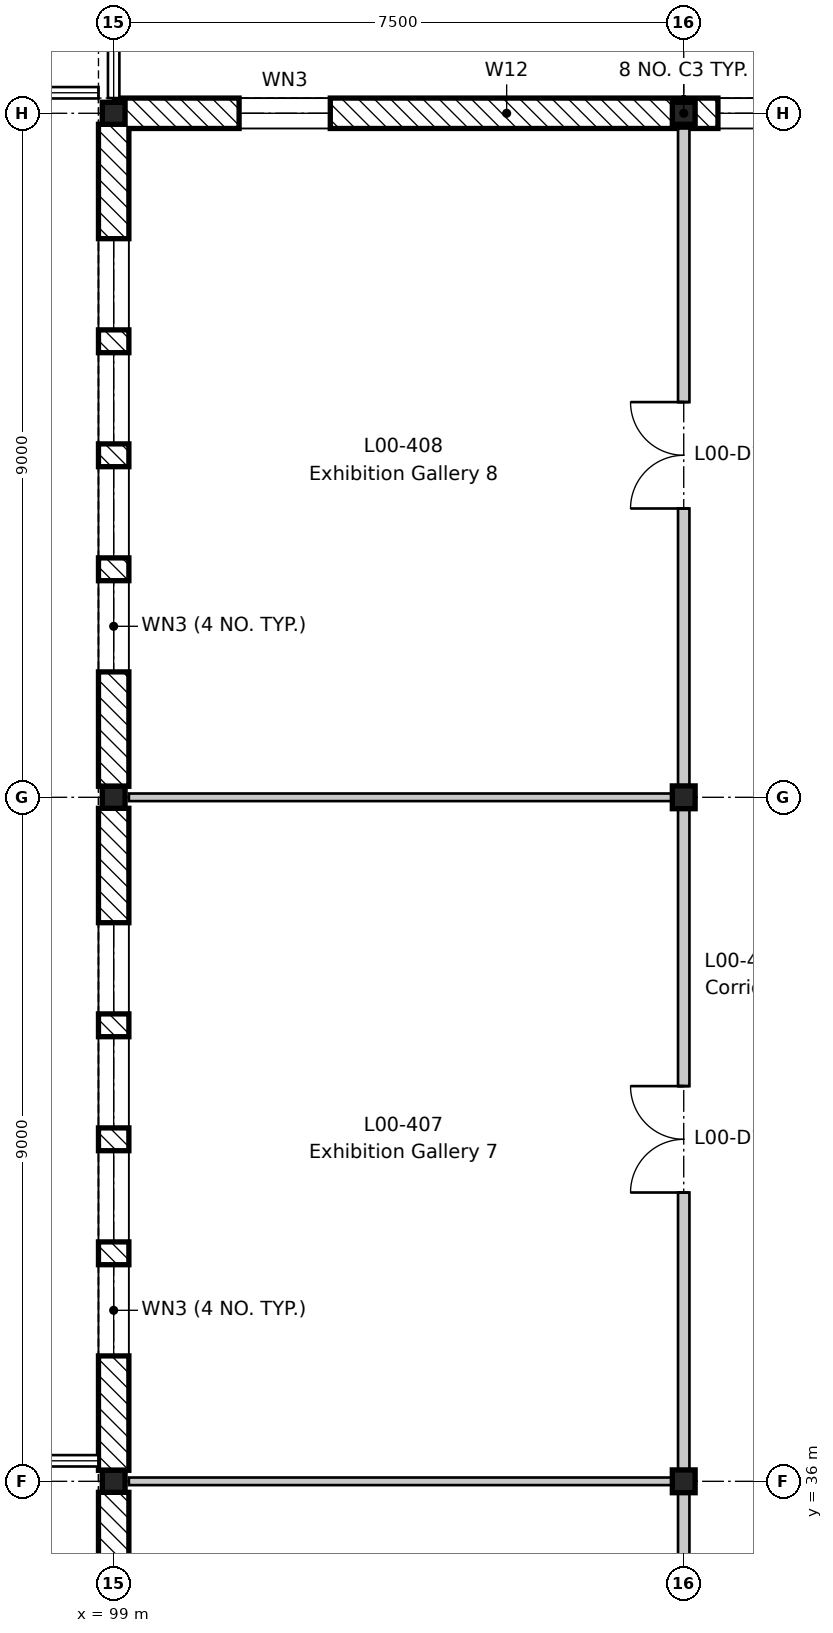
"""IFC4 building model, lengths in metres.
Left out: names, types, materials, properties, quantities, classifications, styles, units other than length and angle.
Written with IfcOpenShell. Run it as: python <this file> out.ifc"""

import sys

from ifc_helpers import new_model, si_unit, direction, frame, frame_2d, origin, origin_2d, place, context, subcontext, project, spatial, rectangle, i_section, extrude, element, fill, save


model = new_model("IFC4")
c1 = context("Model", 3, precision=1e-05, world=origin(), true_north=direction((0.0, 1.0)))
c2 = subcontext(c1, "Body", "Model", "MODEL_VIEW")
j1 = project(units=[si_unit("LENGTHUNIT", "METRE"), si_unit("PLANEANGLEUNIT", "RADIAN")], contexts=[c1])
p1 = place(None, origin())
s1 = spatial("IfcSite", under=j1, at=p1, CompositionType="ELEMENT")
p2 = place(p1, origin())
s2 = spatial("IfcBuilding", under=s1, at=p2, CompositionType="ELEMENT")
p3 = place(p2, origin())
s3 = spatial("IfcBuildingStorey", under=s2, at=p3, CompositionType="ELEMENT", Elevation=0.0)
for number, where, z_axis, x_axis in (
    (1, (99.0, 36.0, -0.6), (0.0, 0.0, 1.0), (1.0, 0.0, 0.0)),
    (2, (99.0, 45.0, -0.6), (0.0, 0.0, 1.0), (1.0, 0.0, 0.0)),
    (3, (99.0, 54.0, -0.6), (0.0, 0.0, 1.0), (1.0, 0.0, 0.0)),
):
    element("IfcColumn", number, at=place(p3, frame(where, z_axis=z_axis, x_axis=x_axis)), inside=s3, PredefinedType="COLUMN", context=c2, shape_type="SweptSolid", body=[
        extrude(i_section(OverallWidth=0.3, OverallDepth=0.29, WebThickness=0.009, FlangeThickness=0.014, FilletRadius=0.027, at=origin_2d()), origin(), (0.0, 0.0, 1.0), 5.8),
    ])
for number, where, z_axis, x_axis in (
    (4, (106.5, 36.0, -0.6), (0.0, 0.0, 1.0), (1.0, 0.0, 0.0)),
    (5, (106.5, 45.0, -0.6), (0.0, 0.0, 1.0), (1.0, 0.0, 0.0)),
):
    element("IfcColumn", number, at=place(p3, frame(where, z_axis=z_axis, x_axis=x_axis)), inside=s3, PredefinedType="COLUMN", context=c2, shape_type="SweptSolid", body=[
        extrude(i_section(OverallWidth=0.3, OverallDepth=0.3, WebThickness=0.011, FlangeThickness=0.019, FilletRadius=0.027, at=origin_2d()), origin(), (0.0, 0.0, 1.0), 5.8),
    ])
p4 = place(p3, frame((106.5, 54.0, -0.6), z_axis=(0.0, 0.0, 1.0), x_axis=(1.0, 0.0, 0.0)))
e6 = element("IfcColumn", 6, at=p4, inside=s3, PredefinedType="COLUMN", context=c2, shape_type="SweptSolid", body=[
    extrude(i_section(OverallWidth=0.3, OverallDepth=0.29, WebThickness=0.009, FlangeThickness=0.014, FilletRadius=0.027, at=origin_2d()), origin(), (0.0, 0.0, 1.0), 5.8),
])
p5 = place(p3, frame((99.0, 27.145, 0.0), z_axis=(0.0, 0.0, 1.0), x_axis=(0.0, 1.0, 0.0)))
e7 = element("IfcWall", 7, at=p5, inside=s3, PredefinedType="STANDARD", context=c2, shape_type="SweptSolid", body=[
    extrude(rectangle(XDim=8.71, YDim=0.4, at=frame_2d((4.355, 0.0))), origin(), (0.0, 0.0, 1.0), 4.8),
])
p6 = place(p5, frame((1.505, 0.0, 0.6)))
e8 = element("IfcOpeningElement", 8, at=p6, cuts=e7, PredefinedType="OPENING", context=c2, shape_type="SweptSolid", body=[
    extrude(rectangle(XDim=1.2, YDim=3.9, at=frame_2d((0.6, 1.95))), frame((0.0, 0.21, 0.0), z_axis=(0.0, -1.0, 0.0), x_axis=(1.0, 0.0, 0.0)), (0.0, 0.0, 1.0), 0.42),
])
p7 = place(p5, frame((3.005, 0.0, 0.6)))
e9 = element("IfcOpeningElement", 9, at=p7, cuts=e7, PredefinedType="OPENING", context=c2, shape_type="SweptSolid", body=[
    extrude(rectangle(XDim=1.2, YDim=3.9, at=frame_2d((0.6, 1.95))), frame((0.0, 0.21, 0.0), z_axis=(0.0, -1.0, 0.0), x_axis=(1.0, 0.0, 0.0)), (0.0, 0.0, 1.0), 0.42),
])
p8 = place(p5, frame((4.505, 0.0, 0.6)))
e10 = element("IfcOpeningElement", 10, at=p8, cuts=e7, PredefinedType="OPENING", context=c2, shape_type="SweptSolid", body=[
    extrude(rectangle(XDim=1.2, YDim=3.9, at=frame_2d((0.6, 1.95))), frame((0.0, 0.21, 0.0), z_axis=(0.0, -1.0, 0.0), x_axis=(1.0, 0.0, 0.0)), (0.0, 0.0, 1.0), 0.42),
])
p9 = place(p5, frame((6.005, 0.0, 0.6)))
e11 = element("IfcOpeningElement", 11, at=p9, cuts=e7, PredefinedType="OPENING", context=c2, shape_type="SweptSolid", body=[
    extrude(rectangle(XDim=1.2, YDim=3.9, at=frame_2d((0.6, 1.95))), frame((0.0, 0.21, 0.0), z_axis=(0.0, -1.0, 0.0), x_axis=(1.0, 0.0, 0.0)), (0.0, 0.0, 1.0), 0.42),
])
p10 = place(p3, frame((99.0, 36.145, 0.0), z_axis=(0.0, 0.0, 1.0), x_axis=(0.0, 1.0, 0.0)))
e12 = element("IfcWall", 12, at=p10, inside=s3, PredefinedType="STANDARD", context=c2, shape_type="SweptSolid", body=[
    extrude(rectangle(XDim=8.71, YDim=0.4, at=frame_2d((4.355, 0.0))), origin(), (0.0, 0.0, 1.0), 4.8),
])
p11 = place(p10, frame((1.505, 0.0, 0.6)))
e13 = element("IfcOpeningElement", 13, at=p11, cuts=e12, PredefinedType="OPENING", context=c2, shape_type="SweptSolid", body=[
    extrude(rectangle(XDim=1.2, YDim=3.9, at=frame_2d((0.6, 1.95))), frame((0.0, 0.21, 0.0), z_axis=(0.0, -1.0, 0.0), x_axis=(1.0, 0.0, 0.0)), (0.0, 0.0, 1.0), 0.42),
])
p12 = place(p10, frame((3.005, 0.0, 0.6)))
e14 = element("IfcOpeningElement", 14, at=p12, cuts=e12, PredefinedType="OPENING", context=c2, shape_type="SweptSolid", body=[
    extrude(rectangle(XDim=1.2, YDim=3.9, at=frame_2d((0.6, 1.95))), frame((0.0, 0.21, 0.0), z_axis=(0.0, -1.0, 0.0), x_axis=(1.0, 0.0, 0.0)), (0.0, 0.0, 1.0), 0.42),
])
p13 = place(p10, frame((4.505, 0.0, 0.6)))
e15 = element("IfcOpeningElement", 15, at=p13, cuts=e12, PredefinedType="OPENING", context=c2, shape_type="SweptSolid", body=[
    extrude(rectangle(XDim=1.2, YDim=3.9, at=frame_2d((0.6, 1.95))), frame((0.0, 0.21, 0.0), z_axis=(0.0, -1.0, 0.0), x_axis=(1.0, 0.0, 0.0)), (0.0, 0.0, 1.0), 0.42),
])
p14 = place(p10, frame((6.005, 0.0, 0.6)))
e16 = element("IfcOpeningElement", 16, at=p14, cuts=e12, PredefinedType="OPENING", context=c2, shape_type="SweptSolid", body=[
    extrude(rectangle(XDim=1.2, YDim=3.9, at=frame_2d((0.6, 1.95))), frame((0.0, 0.21, 0.0), z_axis=(0.0, -1.0, 0.0), x_axis=(1.0, 0.0, 0.0)), (0.0, 0.0, 1.0), 0.42),
])
p15 = place(p3, frame((99.0, 45.145, 0.0), z_axis=(0.0, 0.0, 1.0), x_axis=(0.0, 1.0, 0.0)))
e17 = element("IfcWall", 17, at=p15, inside=s3, PredefinedType="STANDARD", context=c2, shape_type="SweptSolid", body=[
    extrude(rectangle(XDim=8.71, YDim=0.4, at=frame_2d((4.355, 0.0))), origin(), (0.0, 0.0, 1.0), 4.8),
])
p16 = place(p15, frame((1.505, 0.0, 0.6)))
e18 = element("IfcOpeningElement", 18, at=p16, cuts=e17, PredefinedType="OPENING", context=c2, shape_type="SweptSolid", body=[
    extrude(rectangle(XDim=1.2, YDim=3.9, at=frame_2d((0.6, 1.95))), frame((0.0, 0.21, 0.0), z_axis=(0.0, -1.0, 0.0), x_axis=(1.0, 0.0, 0.0)), (0.0, 0.0, 1.0), 0.42),
])
p17 = place(p15, frame((3.005, 0.0, 0.6)))
e19 = element("IfcOpeningElement", 19, at=p17, cuts=e17, PredefinedType="OPENING", context=c2, shape_type="SweptSolid", body=[
    extrude(rectangle(XDim=1.2, YDim=3.9, at=frame_2d((0.6, 1.95))), frame((0.0, 0.21, 0.0), z_axis=(0.0, -1.0, 0.0), x_axis=(1.0, 0.0, 0.0)), (0.0, 0.0, 1.0), 0.42),
])
p18 = place(p15, frame((4.505, 0.0, 0.6)))
e20 = element("IfcOpeningElement", 20, at=p18, cuts=e17, PredefinedType="OPENING", context=c2, shape_type="SweptSolid", body=[
    extrude(rectangle(XDim=1.2, YDim=3.9, at=frame_2d((0.6, 1.95))), frame((0.0, 0.21, 0.0), z_axis=(0.0, -1.0, 0.0), x_axis=(1.0, 0.0, 0.0)), (0.0, 0.0, 1.0), 0.42),
])
p19 = place(p15, frame((6.005, 0.0, 0.6)))
e21 = element("IfcOpeningElement", 21, at=p19, cuts=e17, PredefinedType="OPENING", context=c2, shape_type="SweptSolid", body=[
    extrude(rectangle(XDim=1.2, YDim=3.9, at=frame_2d((0.6, 1.95))), frame((0.0, 0.21, 0.0), z_axis=(0.0, -1.0, 0.0), x_axis=(1.0, 0.0, 0.0)), (0.0, 0.0, 1.0), 0.42),
])
p20 = place(p3, frame((99.009, 54.0, 0.0), z_axis=(0.0, 0.0, 1.0), x_axis=(1.0, 0.0, 0.0)))
e22 = element("IfcWall", 22, at=p20, inside=s3, PredefinedType="STANDARD", context=c2, shape_type="SweptSolid", body=[
    extrude(rectangle(XDim=7.481, YDim=0.4, at=frame_2d((3.741, 0.0))), origin(), (0.0, 0.0, 1.0), 4.87),
])
p21 = place(p20, frame((1.641, 0.0, 0.6)))
e23 = element("IfcOpeningElement", 23, at=p21, cuts=e22, PredefinedType="OPENING", context=c2, shape_type="SweptSolid", body=[
    extrude(rectangle(XDim=1.2, YDim=3.9, at=frame_2d((0.6, 1.95))), frame((0.0, 0.21, 0.0), z_axis=(0.0, -1.0, 0.0), x_axis=(1.0, 0.0, 0.0)), (0.0, 0.0, 1.0), 0.42),
])
p22 = place(p3, frame((106.509, 54.0, 0.0), z_axis=(0.0, 0.0, 1.0), x_axis=(1.0, 0.0, 0.0)))
e24 = element("IfcWall", 24, at=p22, inside=s3, PredefinedType="STANDARD", context=c2, shape_type="SweptSolid", body=[
    extrude(rectangle(XDim=2.981, YDim=0.4, at=frame_2d((1.491, 0.0))), origin(), (0.0, 0.0, 1.0), 5.0),
])
p23 = place(p22, frame((0.441, 0.0, 0.9)))
e25 = element("IfcOpeningElement", 25, at=p23, cuts=e24, PredefinedType="OPENING", context=c2, shape_type="SweptSolid", body=[
    extrude(rectangle(XDim=2.1, YDim=2.1, at=frame_2d((1.05, 1.05))), frame((0.0, 0.21, 0.0), z_axis=(0.0, -1.0, 0.0), x_axis=(1.0, 0.0, 0.0)), (0.0, 0.0, 1.0), 0.42),
])
for number, where, z_axis, x_axis in (
    (26, (99.2, 36.0, 0.0), (0.0, 0.0, 1.0), (1.0, 0.0, 0.0)),
    (27, (99.2, 45.0, 0.0), (0.0, 0.0, 1.0), (1.0, 0.0, 0.0)),
):
    element("IfcWall", number, at=place(p3, frame(where, z_axis=z_axis, x_axis=x_axis)), inside=s3, PredefinedType="PARTITIONING", context=c2, shape_type="SweptSolid", body=[
        extrude(rectangle(XDim=7.225, YDim=0.1, at=frame_2d((3.613, 0.0))), origin(), (0.0, 0.0, 1.0), 4.85),
    ])
p24 = place(p3, frame((106.5, 9.0, 0.0), z_axis=(0.0, 0.0, 1.0), x_axis=(0.0, 1.0, 0.0)))
e28 = element("IfcWall", 28, at=p24, inside=s3, PredefinedType="PARTITIONING", context=c2, shape_type="SweptSolid", body=[
    extrude(rectangle(XDim=44.8, YDim=0.15, at=frame_2d((22.4, 0.0))), origin(), (0.0, 0.0, 1.0), 4.68),
])
p25 = place(p24, frame((3.8, 0.0, 0.0)))
e29 = element("IfcOpeningElement", 29, at=p25, cuts=e28, PredefinedType="OPENING", context=c2, shape_type="SweptSolid", body=[
    extrude(rectangle(XDim=1.4, YDim=2.1, at=frame_2d((0.7, 1.05))), frame((0.0, 0.085, 0.0), z_axis=(0.0, -1.0, 0.0), x_axis=(1.0, 0.0, 0.0)), (0.0, 0.0, 1.0), 0.17),
])
p26 = place(p24, frame((12.8, 0.0, 0.0)))
e30 = element("IfcOpeningElement", 30, at=p26, cuts=e28, PredefinedType="OPENING", context=c2, shape_type="SweptSolid", body=[
    extrude(rectangle(XDim=1.4, YDim=2.1, at=frame_2d((0.7, 1.05))), frame((0.0, 0.085, 0.0), z_axis=(0.0, -1.0, 0.0), x_axis=(1.0, 0.0, 0.0)), (0.0, 0.0, 1.0), 0.17),
])
p27 = place(p24, frame((21.8, 0.0, 0.0)))
e31 = element("IfcOpeningElement", 31, at=p27, cuts=e28, PredefinedType="OPENING", context=c2, shape_type="SweptSolid", body=[
    extrude(rectangle(XDim=1.4, YDim=2.1, at=frame_2d((0.7, 1.05))), frame((0.0, 0.085, 0.0), z_axis=(0.0, -1.0, 0.0), x_axis=(1.0, 0.0, 0.0)), (0.0, 0.0, 1.0), 0.17),
])
p28 = place(p24, frame((30.8, 0.0, 0.0)))
e32 = element("IfcOpeningElement", 32, at=p28, cuts=e28, PredefinedType="OPENING", context=c2, shape_type="SweptSolid", body=[
    extrude(rectangle(XDim=1.4, YDim=2.1, at=frame_2d((0.7, 1.05))), frame((0.0, 0.085, 0.0), z_axis=(0.0, -1.0, 0.0), x_axis=(1.0, 0.0, 0.0)), (0.0, 0.0, 1.0), 0.17),
])
p29 = place(p24, frame((39.8, 0.0, 0.0)))
e33 = element("IfcOpeningElement", 33, at=p29, cuts=e28, PredefinedType="OPENING", context=c2, shape_type="SweptSolid", body=[
    extrude(rectangle(XDim=1.4, YDim=2.1, at=frame_2d((0.7, 1.05))), frame((0.0, 0.085, 0.0), z_axis=(0.0, -1.0, 0.0), x_axis=(1.0, 0.0, 0.0)), (0.0, 0.0, 1.0), 0.17),
])
p30 = place(p11, origin())
e34 = element("IfcWindow", 34, at=p30, inside=s3, PartitioningType="SINGLE_PANEL", PredefinedType="WINDOW", context=c2, shape_type="SweptSolid", body=[
    extrude(rectangle(XDim=1.2, YDim=3.9, at=frame_2d((0.6, 1.95))), frame((0.0, 0.03, 0.0), z_axis=(0.0, -1.0, 0.0), x_axis=(1.0, 0.0, 0.0)), (0.0, 0.0, 1.0), 0.06),
])
fill(e13, e34)
p31 = place(p12, origin())
e35 = element("IfcWindow", 35, at=p31, inside=s3, PartitioningType="SINGLE_PANEL", PredefinedType="WINDOW", context=c2, shape_type="SweptSolid", body=[
    extrude(rectangle(XDim=1.2, YDim=3.9, at=frame_2d((0.6, 1.95))), frame((0.0, 0.03, 0.0), z_axis=(0.0, -1.0, 0.0), x_axis=(1.0, 0.0, 0.0)), (0.0, 0.0, 1.0), 0.06),
])
fill(e14, e35)
p32 = place(p13, origin())
e36 = element("IfcWindow", 36, at=p32, inside=s3, PartitioningType="SINGLE_PANEL", PredefinedType="WINDOW", context=c2, shape_type="SweptSolid", body=[
    extrude(rectangle(XDim=1.2, YDim=3.9, at=frame_2d((0.6, 1.95))), frame((0.0, 0.03, 0.0), z_axis=(0.0, -1.0, 0.0), x_axis=(1.0, 0.0, 0.0)), (0.0, 0.0, 1.0), 0.06),
])
fill(e15, e36)
p33 = place(p14, origin())
e37 = element("IfcWindow", 37, at=p33, inside=s3, PartitioningType="SINGLE_PANEL", PredefinedType="WINDOW", context=c2, shape_type="SweptSolid", body=[
    extrude(rectangle(XDim=1.2, YDim=3.9, at=frame_2d((0.6, 1.95))), frame((0.0, 0.03, 0.0), z_axis=(0.0, -1.0, 0.0), x_axis=(1.0, 0.0, 0.0)), (0.0, 0.0, 1.0), 0.06),
])
fill(e16, e37)
p34 = place(p16, origin())
e38 = element("IfcWindow", 38, at=p34, inside=s3, PartitioningType="SINGLE_PANEL", PredefinedType="WINDOW", context=c2, shape_type="SweptSolid", body=[
    extrude(rectangle(XDim=1.2, YDim=3.9, at=frame_2d((0.6, 1.95))), frame((0.0, 0.03, 0.0), z_axis=(0.0, -1.0, 0.0), x_axis=(1.0, 0.0, 0.0)), (0.0, 0.0, 1.0), 0.06),
])
fill(e18, e38)
p35 = place(p17, origin())
e39 = element("IfcWindow", 39, at=p35, inside=s3, PartitioningType="SINGLE_PANEL", PredefinedType="WINDOW", context=c2, shape_type="SweptSolid", body=[
    extrude(rectangle(XDim=1.2, YDim=3.9, at=frame_2d((0.6, 1.95))), frame((0.0, 0.03, 0.0), z_axis=(0.0, -1.0, 0.0), x_axis=(1.0, 0.0, 0.0)), (0.0, 0.0, 1.0), 0.06),
])
fill(e19, e39)
p36 = place(p18, origin())
e40 = element("IfcWindow", 40, at=p36, inside=s3, PartitioningType="SINGLE_PANEL", PredefinedType="WINDOW", context=c2, shape_type="SweptSolid", body=[
    extrude(rectangle(XDim=1.2, YDim=3.9, at=frame_2d((0.6, 1.95))), frame((0.0, 0.03, 0.0), z_axis=(0.0, -1.0, 0.0), x_axis=(1.0, 0.0, 0.0)), (0.0, 0.0, 1.0), 0.06),
])
fill(e20, e40)
p37 = place(p19, origin())
e41 = element("IfcWindow", 41, at=p37, inside=s3, PartitioningType="SINGLE_PANEL", PredefinedType="WINDOW", context=c2, shape_type="SweptSolid", body=[
    extrude(rectangle(XDim=1.2, YDim=3.9, at=frame_2d((0.6, 1.95))), frame((0.0, 0.03, 0.0), z_axis=(0.0, -1.0, 0.0), x_axis=(1.0, 0.0, 0.0)), (0.0, 0.0, 1.0), 0.06),
])
fill(e21, e41)
p38 = place(p21, origin())
e42 = element("IfcWindow", 42, at=p38, inside=s3, PartitioningType="SINGLE_PANEL", PredefinedType="WINDOW", context=c2, shape_type="SweptSolid", body=[
    extrude(rectangle(XDim=1.2, YDim=3.9, at=frame_2d((0.6, 1.95))), frame((0.0, 0.03, 0.0), z_axis=(0.0, -1.0, 0.0), x_axis=(1.0, 0.0, 0.0)), (0.0, 0.0, 1.0), 0.06),
])
fill(e23, e42)
p39 = place(p23, origin())
e43 = element("IfcWindow", 43, at=p39, inside=s3, PartitioningType="SINGLE_PANEL", PredefinedType="WINDOW", context=c2, shape_type="SweptSolid", body=[
    extrude(rectangle(XDim=2.1, YDim=2.1, at=frame_2d((1.05, 1.05))), frame((0.0, 0.03, 0.0), z_axis=(0.0, -1.0, 0.0), x_axis=(1.0, 0.0, 0.0)), (0.0, 0.0, 1.0), 0.06),
])
fill(e25, e43)
p40 = place(p28, origin())
e44 = element("IfcDoor", 44, at=p40, inside=s3, OperationType="DOUBLE_DOOR_SINGLE_SWING", PredefinedType="DOOR", context=c2, shape_type="SweptSolid", body=[
    extrude(rectangle(XDim=1.4, YDim=2.1, at=frame_2d((0.7, 1.05))), frame((0.0, 0.025, 0.0), z_axis=(0.0, -1.0, 0.0), x_axis=(1.0, 0.0, 0.0)), (0.0, 0.0, 1.0), 0.05),
])
fill(e32, e44)
p41 = place(p29, origin())
e45 = element("IfcDoor", 45, at=p41, inside=s3, OperationType="DOUBLE_DOOR_SINGLE_SWING", PredefinedType="DOOR", context=c2, shape_type="SweptSolid", body=[
    extrude(rectangle(XDim=1.4, YDim=2.1, at=frame_2d((0.7, 1.05))), frame((0.0, 0.025, 0.0), z_axis=(0.0, -1.0, 0.0), x_axis=(1.0, 0.0, 0.0)), (0.0, 0.0, 1.0), 0.05),
])
fill(e33, e45)
save(model, sys.argv[1])
